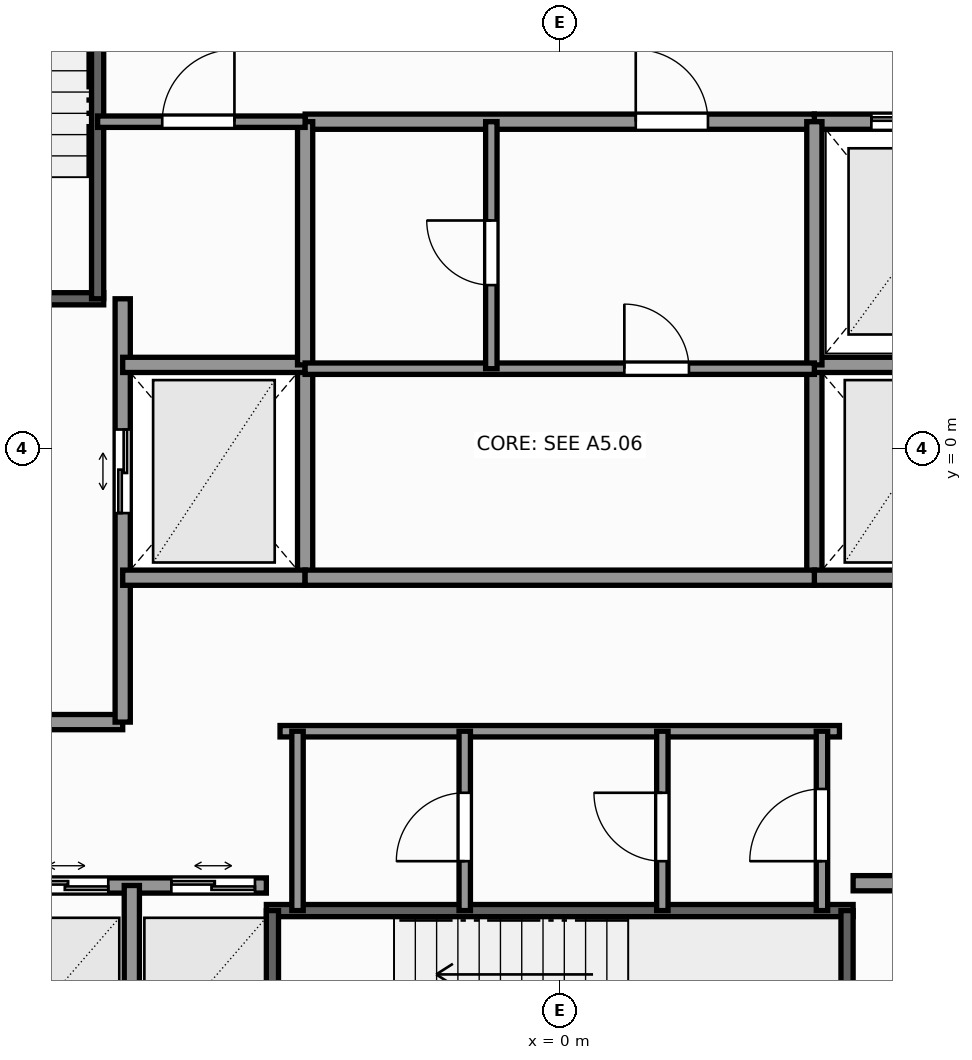
"""IFC4 building model, lengths in metres.
Left out: names, types, materials, properties, quantities, classifications, styles, units other than length and angle.
Written with IfcOpenShell. Run it as: python <this file> out.ifc"""

import sys

from ifc_helpers import new_model, si_unit, direction, frame, frame_2d, origin, place, context, subcontext, project, spatial, rectangle, extrude, element, fill, save


model = new_model("IFC4")
c1 = context("Model", 3, precision=1e-05, world=origin(), true_north=direction((0.0, 1.0)))
c2 = subcontext(c1, "Body", "Model", "MODEL_VIEW")
j1 = project(units=[si_unit("LENGTHUNIT", "METRE"), si_unit("PLANEANGLEUNIT", "RADIAN")], contexts=[c1])
p1 = place(None, origin())
s1 = spatial("IfcSite", under=j1, at=p1, CompositionType="ELEMENT")
p2 = place(p1, origin())
s2 = spatial("IfcBuilding", under=s1, at=p2, CompositionType="ELEMENT")
p3 = place(p2, frame((0.0, 0.0, 68.0)))
s3 = spatial("IfcBuildingStorey", under=s2, at=p3, CompositionType="ELEMENT", Elevation=68.0)
p4 = place(p3, frame((-9.52, 1.97, 0.0), z_axis=(0.0, 0.0, 1.0), x_axis=(1.0, 0.0, 0.0)))
e1 = element("IfcWall", 1, at=p4, inside=s3, PredefinedType="SHEAR", context=c2, shape_type="SweptSolid", body=[
    extrude(rectangle(XDim=3.52, YDim=0.16, at=frame_2d((1.76, 0.0))), origin(), (0.0, 0.0, 1.0), 4.2),
])
p5 = place(p4, frame((1.15, 0.0, 0.0)))
e2 = element("IfcOpeningElement", 2, at=p5, cuts=e1, PredefinedType="OPENING", context=c2, shape_type="SweptSolid", body=[
    extrude(rectangle(XDim=1.1, YDim=2.2, at=frame_2d((0.55, 1.1))), frame((0.0, 0.09, 0.0), z_axis=(0.0, -1.0, 0.0), x_axis=(1.0, 0.0, 0.0)), (0.0, 0.0, 1.0), 0.18),
])
p6 = place(p3, frame((-6.08, 1.97, 0.0), z_axis=(0.0, 0.0, 1.0), x_axis=(0.0, 1.0, 0.0)))
e3 = element("IfcWall", 3, at=p6, inside=s3, PredefinedType="SHEAR", context=c2, shape_type="SweptSolid", body=[
    extrude(rectangle(XDim=7.56, YDim=0.16, at=frame_2d((3.78, 0.0))), origin(), (0.0, 0.0, 1.0), 4.2),
])
p7 = place(p3, frame((-3.86, -6.08, 0.0), z_axis=(0.0, 0.0, 1.0), x_axis=(1.0, 0.0, 0.0)))
e4 = element("IfcWall", 4, at=p7, inside=s3, PredefinedType="SHEAR", context=c2, shape_type="SweptSolid", body=[
    extrude(rectangle(XDim=7.72, YDim=0.16, at=frame_2d((3.86, 0.0))), origin(), (0.0, 0.0, 1.0), 4.2),
])
for number, where, z_axis, x_axis in (
    (5, (-3.78, -9.43, 0.0), (0.0, 0.0, 1.0), (0.0, 1.0, 0.0)),
    (6, (3.78, -9.43, 0.0), (0.0, 0.0, 1.0), (0.0, 1.0, 0.0)),
):
    element("IfcWall", number, at=place(p3, frame(where, z_axis=z_axis, x_axis=x_axis)), inside=s3, PredefinedType="SHEAR", context=c2, shape_type="SweptSolid", body=[
        extrude(rectangle(XDim=3.35, YDim=0.16, at=frame_2d((1.675, 0.0))), origin(), (0.0, 0.0, 1.0), 4.2),
    ])
p8 = place(p3, frame((-9.52, -3.6, 0.0), z_axis=(0.0, 0.0, 1.0), x_axis=(1.0, 0.0, 0.0)))
e7 = element("IfcWall", 7, at=p8, inside=s3, PredefinedType="SOLIDWALL", context=c2, shape_type="SweptSolid", body=[
    extrude(rectangle(XDim=3.77, YDim=0.2, at=frame_2d((1.885, 0.0))), origin(), (0.0, 0.0, 1.0), 3.98),
])
p9 = place(p8, frame((1.15, 0.0, 0.0)))
e8 = element("IfcOpeningElement", 8, at=p9, cuts=e7, PredefinedType="OPENING", context=c2, shape_type="SweptSolid", body=[
    extrude(rectangle(XDim=0.95, YDim=2.06, at=frame_2d((0.475, 1.03))), frame((0.0, 0.11, 0.0), z_axis=(0.0, -1.0, 0.0), x_axis=(1.0, 0.0, 0.0)), (0.0, 0.0, 1.0), 0.22),
])
p10 = place(p3, frame((-5.75, -3.6, 0.0), z_axis=(0.0, 0.0, 1.0), x_axis=(0.0, 1.0, 0.0)))
e9 = element("IfcWall", 9, at=p10, inside=s3, PredefinedType="SOLIDWALL", context=c2, shape_type="SweptSolid", body=[
    extrude(rectangle(XDim=5.57, YDim=0.2, at=frame_2d((2.785, 0.0))), origin(), (0.0, 0.0, 1.0), 3.98),
])
p11 = place(p10, frame((2.75, 0.0, 0.0)))
e10 = element("IfcOpeningElement", 10, at=p11, cuts=e9, PredefinedType="OPENING", context=c2, shape_type="SweptSolid", body=[
    extrude(rectangle(XDim=1.1, YDim=2.2, at=frame_2d((0.55, 1.1))), frame((0.0, 0.11, 0.0), z_axis=(0.0, -1.0, 0.0), x_axis=(1.0, 0.0, 0.0)), (0.0, 0.0, 1.0), 0.22),
])
p12 = place(p3, frame((-3.35, -1.7, 0.0), z_axis=(0.0, 0.0, 1.0), x_axis=(0.0, 1.0, 0.0)))
e11 = element("IfcWall", 11, at=p12, inside=s3, PredefinedType="SOLIDWALL", context=c2, shape_type="SweptSolid", body=[
    extrude(rectangle(XDim=2.8, YDim=0.2, at=frame_2d((1.4, 0.0))), origin(), (0.0, 0.0, 1.0), 3.98),
])
for number, where, z_axis, x_axis in (
    (12, (-5.75, -1.7, 0.0), (0.0, 0.0, 1.0), (1.0, 0.0, 0.0)),
    (13, (-5.75, 1.1, 0.0), (0.0, 0.0, 1.0), (1.0, 0.0, 0.0)),
):
    element("IfcWall", number, at=place(p3, frame(where, z_axis=z_axis, x_axis=x_axis)), inside=s3, PredefinedType="SOLIDWALL", context=c2, shape_type="SweptSolid", body=[
        extrude(rectangle(XDim=2.4, YDim=0.2, at=frame_2d((1.2, 0.0))), origin(), (0.0, 0.0, 1.0), 3.98),
    ])
p13 = place(p3, frame((3.35, -1.7, 0.0), z_axis=(0.0, 0.0, 1.0), x_axis=(0.0, 1.0, 0.0)))
e14 = element("IfcWall", 14, at=p13, inside=s3, PredefinedType="SOLIDWALL", context=c2, shape_type="SweptSolid", body=[
    extrude(rectangle(XDim=2.8, YDim=0.2, at=frame_2d((1.4, 0.0))), origin(), (0.0, 0.0, 1.0), 3.98),
])
for number, where, z_axis, x_axis in (
    (15, (3.35, -1.7, 0.0), (0.0, 0.0, 1.0), (1.0, 0.0, 0.0)),
    (16, (3.35, 1.1, 0.0), (0.0, 0.0, 1.0), (1.0, 0.0, 0.0)),
):
    element("IfcWall", number, at=place(p3, frame(where, z_axis=z_axis, x_axis=x_axis)), inside=s3, PredefinedType="SOLIDWALL", context=c2, shape_type="SweptSolid", body=[
        extrude(rectangle(XDim=2.4, YDim=0.2, at=frame_2d((1.2, 0.0))), origin(), (0.0, 0.0, 1.0), 3.98),
    ])
p14 = place(p3, frame((3.35, 4.3, 0.0), z_axis=(0.0, 0.0, 1.0), x_axis=(1.0, 0.0, 0.0)))
e17 = element("IfcWall", 17, at=p14, inside=s3, PredefinedType="SOLIDWALL", context=c2, shape_type="SweptSolid", body=[
    extrude(rectangle(XDim=2.73, YDim=0.2, at=frame_2d((1.365, 0.0))), origin(), (0.0, 0.0, 1.0), 3.98),
])
p15 = place(p14, frame((0.75, 0.0, 0.0)))
e18 = element("IfcOpeningElement", 18, at=p15, cuts=e17, PredefinedType="OPENING", context=c2, shape_type="SweptSolid", body=[
    extrude(rectangle(XDim=1.2, YDim=2.25, at=frame_2d((0.6, 1.125))), frame((0.0, 0.11, 0.0), z_axis=(0.0, -1.0, 0.0), x_axis=(1.0, 0.0, 0.0)), (0.0, 0.0, 1.0), 0.22),
])
p16 = place(p3, frame((-9.52, -5.75, 0.0), z_axis=(0.0, 0.0, 1.0), x_axis=(1.0, 0.0, 0.0)))
e19 = element("IfcWall", 19, at=p16, inside=s3, PredefinedType="SOLIDWALL", context=c2, shape_type="SweptSolid", body=[
    extrude(rectangle(XDim=5.66, YDim=0.2, at=frame_2d((2.83, 0.0))), origin(), (0.0, 0.0, 1.0), 3.98),
])
p17 = place(p16, frame((0.55, 0.0, 0.0)))
e20 = element("IfcOpeningElement", 20, at=p17, cuts=e19, PredefinedType="OPENING", context=c2, shape_type="SweptSolid", body=[
    extrude(rectangle(XDim=1.1, YDim=2.2, at=frame_2d((0.55, 1.1))), frame((0.0, 0.11, 0.0), z_axis=(0.0, -1.0, 0.0), x_axis=(1.0, 0.0, 0.0)), (0.0, 0.0, 1.0), 0.22),
])
p18 = place(p16, frame((2.48, 0.0, 0.0)))
e21 = element("IfcOpeningElement", 21, at=p18, cuts=e19, PredefinedType="OPENING", context=c2, shape_type="SweptSolid", body=[
    extrude(rectangle(XDim=1.1, YDim=2.2, at=frame_2d((0.55, 1.1))), frame((0.0, 0.11, 0.0), z_axis=(0.0, -1.0, 0.0), x_axis=(1.0, 0.0, 0.0)), (0.0, 0.0, 1.0), 0.22),
])
p19 = place(p16, frame((4.41, 0.0, 0.0)))
e22 = element("IfcOpeningElement", 22, at=p19, cuts=e19, PredefinedType="OPENING", context=c2, shape_type="SweptSolid", body=[
    extrude(rectangle(XDim=1.1, YDim=2.2, at=frame_2d((0.55, 1.1))), frame((0.0, 0.11, 0.0), z_axis=(0.0, -1.0, 0.0), x_axis=(1.0, 0.0, 0.0)), (0.0, 0.0, 1.0), 0.22),
])
p20 = place(p3, frame((-5.63, -9.52, 0.0), z_axis=(0.0, 0.0, 1.0), x_axis=(0.0, 1.0, 0.0)))
e23 = element("IfcWall", 23, at=p20, inside=s3, PredefinedType="SOLIDWALL", context=c2, shape_type="SweptSolid", body=[
    extrude(rectangle(XDim=3.77, YDim=0.2, at=frame_2d((1.885, 0.0))), origin(), (0.0, 0.0, 1.0), 3.98),
])
p21 = place(p3, frame((3.86, -5.72, 0.0), z_axis=(0.0, 0.0, 1.0), x_axis=(1.0, 0.0, 0.0)))
e24 = element("IfcWall", 24, at=p21, inside=s3, PredefinedType="SOLIDWALL", context=c2, shape_type="SweptSolid", body=[
    extrude(rectangle(XDim=5.66, YDim=0.2, at=frame_2d((2.83, 0.0))), origin(), (0.0, 0.0, 1.0), 3.98),
])
p22 = place(p21, frame((0.85, 0.0, 0.0)))
e25 = element("IfcOpeningElement", 25, at=p22, cuts=e24, PredefinedType="OPENING", context=c2, shape_type="SweptSolid", body=[
    extrude(rectangle(XDim=0.95, YDim=2.06, at=frame_2d((0.475, 1.03))), frame((0.0, 0.11, 0.0), z_axis=(0.0, -1.0, 0.0), x_axis=(1.0, 0.0, 0.0)), (0.0, 0.0, 1.0), 0.22),
])
p23 = place(p21, frame((3.6, 0.0, 0.0)))
e26 = element("IfcOpeningElement", 26, at=p23, cuts=e24, PredefinedType="OPENING", context=c2, shape_type="SweptSolid", body=[
    extrude(rectangle(XDim=0.85, YDim=2.03, at=frame_2d((0.425, 1.015))), frame((0.0, 0.11, 0.0), z_axis=(0.0, -1.0, 0.0), x_axis=(1.0, 0.0, 0.0)), (0.0, 0.0, 1.0), 0.22),
])
p24 = place(p3, frame((-3.35, 4.3, 0.0), z_axis=(0.0, 0.0, 1.0), x_axis=(1.0, 0.0, 0.0)))
e27 = element("IfcWall", 27, at=p24, inside=s3, PredefinedType="SOLIDWALL", context=c2, shape_type="SweptSolid", body=[
    extrude(rectangle(XDim=6.7, YDim=0.2, at=frame_2d((3.35, 0.0))), origin(), (0.0, 0.0, 1.0), 3.98),
])
p25 = place(p24, frame((4.35, 0.0, 0.0)))
e28 = element("IfcOpeningElement", 28, at=p25, cuts=e27, PredefinedType="OPENING", context=c2, shape_type="SweptSolid", body=[
    extrude(rectangle(XDim=0.95, YDim=2.06, at=frame_2d((0.475, 1.03))), frame((0.0, 0.11, 0.0), z_axis=(0.0, -1.0, 0.0), x_axis=(1.0, 0.0, 0.0)), (0.0, 0.0, 1.0), 0.22),
])
p26 = place(p3, frame((-3.35, -1.7, 0.0), z_axis=(0.0, 0.0, 1.0), x_axis=(1.0, 0.0, 0.0)))
e29 = element("IfcWall", 29, at=p26, inside=s3, PredefinedType="SOLIDWALL", context=c2, shape_type="SweptSolid", body=[
    extrude(rectangle(XDim=6.7, YDim=0.2, at=frame_2d((3.35, 0.0))), origin(), (0.0, 0.0, 1.0), 3.98),
])
for number, where, z_axis, x_axis in (
    (30, (-3.35, 1.1, 0.0), (0.0, 0.0, 1.0), (0.0, 1.0, 0.0)),
    (31, (3.35, 1.1, 0.0), (0.0, 0.0, 1.0), (0.0, 1.0, 0.0)),
):
    element("IfcWall", number, at=place(p3, frame(where, z_axis=z_axis, x_axis=x_axis)), inside=s3, PredefinedType="SOLIDWALL", context=c2, shape_type="SweptSolid", body=[
        extrude(rectangle(XDim=3.2, YDim=0.2, at=frame_2d((1.6, 0.0))), origin(), (0.0, 0.0, 1.0), 3.98),
    ])
p27 = place(p3, frame((-3.35, 1.05, 0.0), z_axis=(0.0, 0.0, 1.0), x_axis=(1.0, 0.0, 0.0)))
e32 = element("IfcWall", 32, at=p27, inside=s3, PredefinedType="PARTITIONING", context=c2, shape_type="SweptSolid", body=[
    extrude(rectangle(XDim=6.7, YDim=0.15, at=frame_2d((3.35, 0.0))), origin(), (0.0, 0.0, 1.0), 3.98),
])
p28 = place(p27, frame((4.2, 0.0, 0.0)))
e33 = element("IfcOpeningElement", 33, at=p28, cuts=e32, PredefinedType="OPENING", context=c2, shape_type="SweptSolid", body=[
    extrude(rectangle(XDim=0.85, YDim=2.03, at=frame_2d((0.425, 1.015))), frame((0.0, 0.085, 0.0), z_axis=(0.0, -1.0, 0.0), x_axis=(1.0, 0.0, 0.0)), (0.0, 0.0, 1.0), 0.17),
])
p29 = place(p3, frame((-0.9, 1.05, 0.0), z_axis=(0.0, 0.0, 1.0), x_axis=(0.0, 1.0, 0.0)))
e34 = element("IfcWall", 34, at=p29, inside=s3, PredefinedType="PARTITIONING", context=c2, shape_type="SweptSolid", body=[
    extrude(rectangle(XDim=3.25, YDim=0.15, at=frame_2d((1.625, 0.0))), origin(), (0.0, 0.0, 1.0), 3.98),
])
p30 = place(p29, frame((1.1, 0.0, 0.0)))
e35 = element("IfcOpeningElement", 35, at=p30, cuts=e34, PredefinedType="OPENING", context=c2, shape_type="SweptSolid", body=[
    extrude(rectangle(XDim=0.85, YDim=2.03, at=frame_2d((0.425, 1.015))), frame((0.0, 0.085, 0.0), z_axis=(0.0, -1.0, 0.0), x_axis=(1.0, 0.0, 0.0)), (0.0, 0.0, 1.0), 0.17),
])
p31 = place(p3, frame((-3.68, -3.72, 0.0), z_axis=(0.0, 0.0, 1.0), x_axis=(1.0, 0.0, 0.0)))
e36 = element("IfcWall", 36, at=p31, inside=s3, PredefinedType="PARTITIONING", context=c2, shape_type="SweptSolid", body=[
    extrude(rectangle(XDim=7.36, YDim=0.15, at=frame_2d((3.68, 0.0))), origin(), (0.0, 0.0, 1.0), 3.98),
])
p32 = place(p3, frame((3.45, -6.08, 0.0), z_axis=(0.0, 0.0, 1.0), x_axis=(0.0, 1.0, 0.0)))
e37 = element("IfcWall", 37, at=p32, inside=s3, PredefinedType="PARTITIONING", context=c2, shape_type="SweptSolid", body=[
    extrude(rectangle(XDim=2.36, YDim=0.15, at=frame_2d((1.18, 0.0))), origin(), (0.0, 0.0, 1.0), 3.98),
])
p33 = place(p32, frame((0.65, 0.0, 0.0)))
e38 = element("IfcOpeningElement", 38, at=p33, cuts=e37, PredefinedType="OPENING", context=c2, shape_type="SweptSolid", body=[
    extrude(rectangle(XDim=0.95, YDim=2.06, at=frame_2d((0.475, 1.03))), frame((0.0, 0.085, 0.0), z_axis=(0.0, -1.0, 0.0), x_axis=(1.0, 0.0, 0.0)), (0.0, 0.0, 1.0), 0.17),
])
p34 = place(p3, frame((-3.45, -6.08, 0.0), z_axis=(0.0, 0.0, 1.0), x_axis=(0.0, 1.0, 0.0)))
e39 = element("IfcWall", 39, at=p34, inside=s3, PredefinedType="PARTITIONING", context=c2, shape_type="SweptSolid", body=[
    extrude(rectangle(XDim=2.36, YDim=0.15, at=frame_2d((1.18, 0.0))), origin(), (0.0, 0.0, 1.0), 3.98),
])
p35 = place(p3, frame((1.35, -6.08, 0.0), z_axis=(0.0, 0.0, 1.0), x_axis=(0.0, 1.0, 0.0)))
e40 = element("IfcWall", 40, at=p35, inside=s3, PredefinedType="PARTITIONING", context=c2, shape_type="SweptSolid", body=[
    extrude(rectangle(XDim=2.36, YDim=0.15, at=frame_2d((1.18, 0.0))), origin(), (0.0, 0.0, 1.0), 3.98),
])
p36 = place(p35, frame((0.65, 0.0, 0.0)))
e41 = element("IfcOpeningElement", 41, at=p36, cuts=e40, PredefinedType="OPENING", context=c2, shape_type="SweptSolid", body=[
    extrude(rectangle(XDim=0.9, YDim=2.06, at=frame_2d((0.45, 1.03))), frame((0.0, 0.085, 0.0), z_axis=(0.0, -1.0, 0.0), x_axis=(1.0, 0.0, 0.0)), (0.0, 0.0, 1.0), 0.17),
])
p37 = place(p3, frame((-1.25, -6.08, 0.0), z_axis=(0.0, 0.0, 1.0), x_axis=(0.0, 1.0, 0.0)))
e42 = element("IfcWall", 42, at=p37, inside=s3, PredefinedType="PARTITIONING", context=c2, shape_type="SweptSolid", body=[
    extrude(rectangle(XDim=2.36, YDim=0.15, at=frame_2d((1.18, 0.0))), origin(), (0.0, 0.0, 1.0), 3.98),
])
p38 = place(p37, frame((0.65, 0.0, 0.0)))
e43 = element("IfcOpeningElement", 43, at=p38, cuts=e42, PredefinedType="OPENING", context=c2, shape_type="SweptSolid", body=[
    extrude(rectangle(XDim=0.9, YDim=2.06, at=frame_2d((0.45, 1.03))), frame((0.0, 0.085, 0.0), z_axis=(0.0, -1.0, 0.0), x_axis=(1.0, 0.0, 0.0)), (0.0, 0.0, 1.0), 0.17),
])
p39 = place(p3, frame((-6.08, 4.3, 0.0), z_axis=(0.0, 0.0, 1.0), x_axis=(1.0, 0.0, 0.0)))
e44 = element("IfcWall", 44, at=p39, inside=s3, PredefinedType="PARTITIONING", context=c2, shape_type="SweptSolid", body=[
    extrude(rectangle(XDim=2.73, YDim=0.15, at=frame_2d((1.365, 0.0))), origin(), (0.0, 0.0, 1.0), 3.98),
])
p40 = place(p39, frame((0.85, 0.0, 0.0)))
e45 = element("IfcOpeningElement", 45, at=p40, cuts=e44, PredefinedType="OPENING", context=c2, shape_type="SweptSolid", body=[
    extrude(rectangle(XDim=0.95, YDim=2.06, at=frame_2d((0.475, 1.03))), frame((0.0, 0.085, 0.0), z_axis=(0.0, -1.0, 0.0), x_axis=(1.0, 0.0, 0.0)), (0.0, 0.0, 1.0), 0.17),
])
p41 = place(p11, origin())
e46 = element("IfcDoor", 46, at=p41, inside=s3, OperationType="DOUBLE_DOOR_SLIDING", PredefinedType="DOOR", context=c2, shape_type="SweptSolid", body=[
    extrude(rectangle(XDim=1.1, YDim=2.2, at=frame_2d((0.55, 1.1))), frame((0.0, 0.025, 0.0), z_axis=(0.0, -1.0, 0.0), x_axis=(1.0, 0.0, 0.0)), (0.0, 0.0, 1.0), 0.05),
])
fill(e10, e46)
p42 = place(p15, origin())
e47 = element("IfcDoor", 47, at=p42, inside=s3, OperationType="DOUBLE_DOOR_SLIDING", PredefinedType="DOOR", context=c2, shape_type="SweptSolid", body=[
    extrude(rectangle(XDim=1.2, YDim=2.25, at=frame_2d((0.6, 1.125))), frame((0.0, 0.025, 0.0), z_axis=(0.0, -1.0, 0.0), x_axis=(1.0, 0.0, 0.0)), (0.0, 0.0, 1.0), 0.05),
])
fill(e18, e47)
p43 = place(p18, origin())
e48 = element("IfcDoor", 48, at=p43, inside=s3, OperationType="DOUBLE_DOOR_SLIDING", PredefinedType="DOOR", context=c2, shape_type="SweptSolid", body=[
    extrude(rectangle(XDim=1.1, YDim=2.2, at=frame_2d((0.55, 1.1))), frame((0.0, 0.025, 0.0), z_axis=(0.0, -1.0, 0.0), x_axis=(1.0, 0.0, 0.0)), (0.0, 0.0, 1.0), 0.05),
])
fill(e21, e48)
p44 = place(p19, origin())
e49 = element("IfcDoor", 49, at=p44, inside=s3, OperationType="DOUBLE_DOOR_SLIDING", PredefinedType="DOOR", context=c2, shape_type="SweptSolid", body=[
    extrude(rectangle(XDim=1.1, YDim=2.2, at=frame_2d((0.55, 1.1))), frame((0.0, 0.025, 0.0), z_axis=(0.0, -1.0, 0.0), x_axis=(1.0, 0.0, 0.0)), (0.0, 0.0, 1.0), 0.05),
])
fill(e22, e49)
p45 = place(p25, origin())
e50 = element("IfcDoor", 50, at=p45, inside=s3, OperationType="SINGLE_SWING_LEFT", PredefinedType="DOOR", context=c2, shape_type="SweptSolid", body=[
    extrude(rectangle(XDim=0.95, YDim=2.06, at=frame_2d((0.475, 1.03))), frame((0.0, 0.025, 0.0), z_axis=(0.0, -1.0, 0.0), x_axis=(1.0, 0.0, 0.0)), (0.0, 0.0, 1.0), 0.05),
])
fill(e28, e50)
p46 = place(p28, origin())
e51 = element("IfcDoor", 51, at=p46, inside=s3, OperationType="SINGLE_SWING_LEFT", PredefinedType="DOOR", context=c2, shape_type="SweptSolid", body=[
    extrude(rectangle(XDim=0.85, YDim=2.03, at=frame_2d((0.425, 1.015))), frame((0.0, 0.025, 0.0), z_axis=(0.0, -1.0, 0.0), x_axis=(1.0, 0.0, 0.0)), (0.0, 0.0, 1.0), 0.05),
])
fill(e33, e51)
p47 = place(p30, origin())
e52 = element("IfcDoor", 52, at=p47, inside=s3, OperationType="SINGLE_SWING_RIGHT", PredefinedType="DOOR", context=c2, shape_type="SweptSolid", body=[
    extrude(rectangle(XDim=0.85, YDim=2.03, at=frame_2d((0.425, 1.015))), frame((0.0, 0.025, 0.0), z_axis=(0.0, -1.0, 0.0), x_axis=(1.0, 0.0, 0.0)), (0.0, 0.0, 1.0), 0.05),
])
fill(e35, e52)
p48 = place(p33, origin())
e53 = element("IfcDoor", 53, at=p48, inside=s3, OperationType="SINGLE_SWING_LEFT", PredefinedType="DOOR", context=c2, shape_type="SweptSolid", body=[
    extrude(rectangle(XDim=0.95, YDim=2.06, at=frame_2d((0.475, 1.03))), frame((0.0, 0.025, 0.0), z_axis=(0.0, -1.0, 0.0), x_axis=(1.0, 0.0, 0.0)), (0.0, 0.0, 1.0), 0.05),
])
fill(e38, e53)
p49 = place(p36, origin())
e54 = element("IfcDoor", 54, at=p49, inside=s3, OperationType="SINGLE_SWING_RIGHT", PredefinedType="DOOR", context=c2, shape_type="SweptSolid", body=[
    extrude(rectangle(XDim=0.9, YDim=2.06, at=frame_2d((0.45, 1.03))), frame((0.0, 0.025, 0.0), z_axis=(0.0, -1.0, 0.0), x_axis=(1.0, 0.0, 0.0)), (0.0, 0.0, 1.0), 0.05),
])
fill(e41, e54)
p50 = place(p38, origin())
e55 = element("IfcDoor", 55, at=p50, inside=s3, OperationType="SINGLE_SWING_LEFT", PredefinedType="DOOR", context=c2, shape_type="SweptSolid", body=[
    extrude(rectangle(XDim=0.9, YDim=2.06, at=frame_2d((0.45, 1.03))), frame((0.0, 0.025, 0.0), z_axis=(0.0, -1.0, 0.0), x_axis=(1.0, 0.0, 0.0)), (0.0, 0.0, 1.0), 0.05),
])
fill(e43, e55)
p51 = place(p40, origin())
e56 = element("IfcDoor", 56, at=p51, inside=s3, OperationType="SINGLE_SWING_RIGHT", PredefinedType="DOOR", context=c2, shape_type="SweptSolid", body=[
    extrude(rectangle(XDim=0.95, YDim=2.06, at=frame_2d((0.475, 1.03))), frame((0.0, 0.025, 0.0), z_axis=(0.0, -1.0, 0.0), x_axis=(1.0, 0.0, 0.0)), (0.0, 0.0, 1.0), 0.05),
])
fill(e45, e56)
save(model, sys.argv[1])
